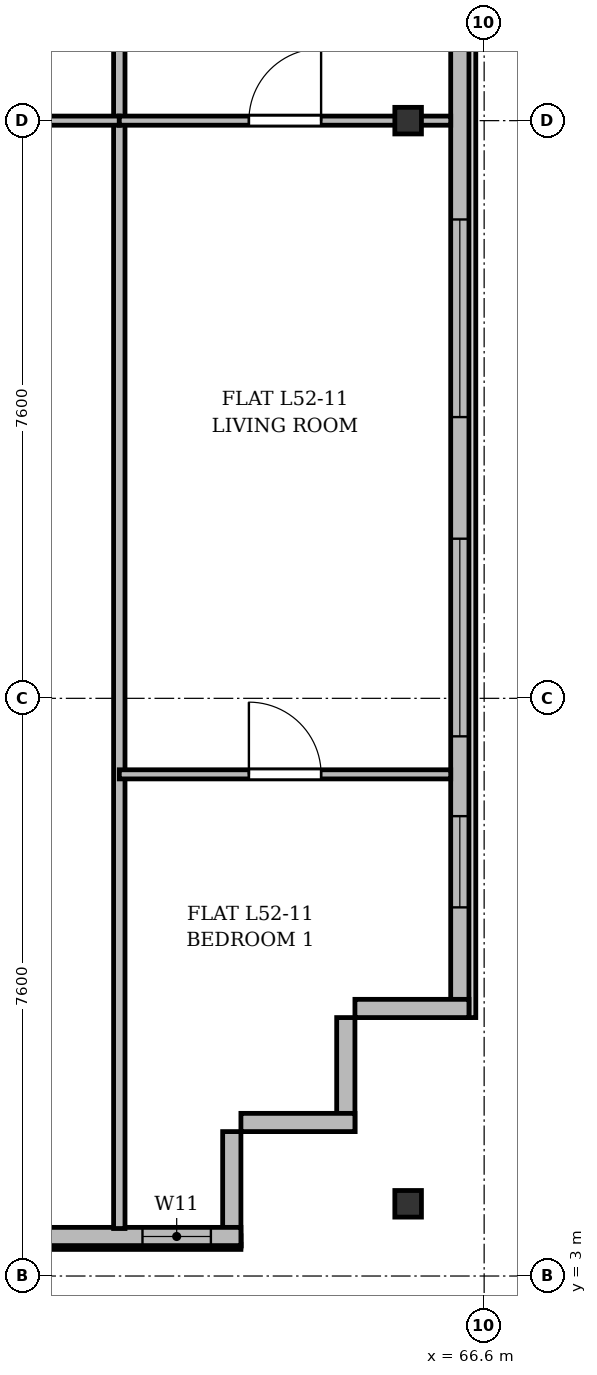
"""IFC4 building model, lengths in metres.
Left out: names, types, materials, properties, quantities, classifications, styles, units other than length and angle.
Written with IfcOpenShell. Run it as: python <this file> out.ifc"""

import sys

from ifc_helpers import new_model, si_unit, direction, frame, frame_2d, origin, origin_2d, place, context, subcontext, project, spatial, rectangle, i_section, extrude, source, transform, mapped, element, fill, save


model = new_model("IFC4")
c1 = context("Model", 3, precision=1e-05, world=origin(), true_north=direction((0.0, 1.0)))
c2 = subcontext(c1, "Body", "Model", "MODEL_VIEW")
j1 = project(units=[si_unit("LENGTHUNIT", "METRE"), si_unit("PLANEANGLEUNIT", "RADIAN")], contexts=[c1])
p1 = place(None, origin())
s1 = spatial("IfcSite", under=j1, at=p1, CompositionType="ELEMENT")
p2 = place(p1, origin())
s2 = spatial("IfcBuilding", under=s1, at=p2, CompositionType="ELEMENT")
p3 = place(p2, frame((0.0, 0.0, 201.3)))
s3 = spatial("IfcBuildingStorey", under=s2, at=p3, CompositionType="ELEMENT", Elevation=201.3)
m1 = source(origin(), c2, "Body", "SweptSolid", [
    extrude(i_section(OverallWidth=0.35, OverallDepth=0.35, WebThickness=0.018, FlangeThickness=0.028, at=origin_2d()), origin(), (0.0, 0.0, 1.0), 3.6),
])
for number, where, z_axis, x_axis in (
    (1, (65.6, 3.95, 0.0), (0.0, 0.0, 1.0), (1.0, 0.0, 0.0)),
    (2, (65.6, 18.2, 0.0), (0.0, 0.0, 1.0), (1.0, 0.0, 0.0)),
):
    element("IfcColumn", number, at=place(p3, frame(where, z_axis=z_axis, x_axis=x_axis)), inside=s3, PredefinedType="COLUMN", context=c2, shape_type="MappedRepresentation", body=[
        mapped(m1, transform((0.0, 0.0, 0.0), x_axis=(1.0, 0.0, 0.0), y_axis=(0.0, 1.0, 0.0), z_axis=(0.0, 0.0, 1.0), scale=1.0)),
    ])
p4 = place(p3, frame((66.28, 45.5, 0.0), z_axis=(0.0, 0.0, 1.0), x_axis=(0.0, -1.0, 0.0)))
e3 = element("IfcWall", 3, at=p4, inside=s3, PredefinedType="SOLIDWALL", context=c2, shape_type="SweptSolid", body=[
    extrude(rectangle(XDim=39.1, YDim=0.24, at=frame_2d((19.55, 0.0))), origin(), (0.0, 0.0, 1.0), 3.22),
])
p5 = place(p4, frame((36.45, 0.0, 0.92)))
e4 = element("IfcOpeningElement", 4, at=p5, cuts=e3, PredefinedType="OPENING", context=c2, shape_type="SweptSolid", body=[
    extrude(rectangle(XDim=1.2, YDim=1.65, at=frame_2d((0.6, 0.825))), frame((0.0, 0.13, 0.0), z_axis=(0.0, -1.0, 0.0), x_axis=(1.0, 0.0, 0.0)), (0.0, 0.0, 1.0), 0.26),
])
p6 = place(p4, frame((32.8, 0.0, 0.92)))
e5 = element("IfcOpeningElement", 5, at=p6, cuts=e3, PredefinedType="OPENING", context=c2, shape_type="SweptSolid", body=[
    extrude(rectangle(XDim=2.6, YDim=1.9, at=frame_2d((1.3, 0.95))), frame((0.0, 0.13, 0.0), z_axis=(0.0, -1.0, 0.0), x_axis=(1.0, 0.0, 0.0)), (0.0, 0.0, 1.0), 0.26),
])
p7 = place(p4, frame((28.6, 0.0, 0.92)))
e6 = element("IfcOpeningElement", 6, at=p7, cuts=e3, PredefinedType="OPENING", context=c2, shape_type="SweptSolid", body=[
    extrude(rectangle(XDim=2.6, YDim=1.9, at=frame_2d((1.3, 0.95))), frame((0.0, 0.13, 0.0), z_axis=(0.0, -1.0, 0.0), x_axis=(1.0, 0.0, 0.0)), (0.0, 0.0, 1.0), 0.26),
])
p8 = place(p4, frame((21.4, 0.0, 0.92)))
e7 = element("IfcOpeningElement", 7, at=p8, cuts=e3, PredefinedType="OPENING", context=c2, shape_type="SweptSolid", body=[
    extrude(rectangle(XDim=2.6, YDim=1.9, at=frame_2d((1.3, 0.95))), frame((0.0, 0.13, 0.0), z_axis=(0.0, -1.0, 0.0), x_axis=(1.0, 0.0, 0.0)), (0.0, 0.0, 1.0), 0.26),
])
p9 = place(p4, frame((7.4, 0.0, 0.92)))
e8 = element("IfcOpeningElement", 8, at=p9, cuts=e3, PredefinedType="OPENING", context=c2, shape_type="SweptSolid", body=[
    extrude(rectangle(XDim=2.6, YDim=1.9, at=frame_2d((1.3, 0.95))), frame((0.0, 0.13, 0.0), z_axis=(0.0, -1.0, 0.0), x_axis=(1.0, 0.0, 0.0)), (0.0, 0.0, 1.0), 0.26),
])
p10 = place(p4, frame((4.5, 0.0, 0.92)))
e9 = element("IfcOpeningElement", 9, at=p10, cuts=e3, PredefinedType="OPENING", context=c2, shape_type="SweptSolid", body=[
    extrude(rectangle(XDim=1.2, YDim=1.65, at=frame_2d((0.6, 0.825))), frame((0.0, 0.13, 0.0), z_axis=(0.0, -1.0, 0.0), x_axis=(1.0, 0.0, 0.0)), (0.0, 0.0, 1.0), 0.26),
])
p11 = place(p4, frame((1.15, 0.0, 0.92)))
e10 = element("IfcOpeningElement", 10, at=p11, cuts=e3, PredefinedType="OPENING", context=c2, shape_type="SweptSolid", body=[
    extrude(rectangle(XDim=1.2, YDim=1.65, at=frame_2d((0.6, 0.825))), frame((0.0, 0.13, 0.0), z_axis=(0.0, -1.0, 0.0), x_axis=(1.0, 0.0, 0.0)), (0.0, 0.0, 1.0), 0.26),
])
p12 = place(p3, frame((66.4, 6.52, 0.0), z_axis=(0.0, 0.0, 1.0), x_axis=(-1.0, 0.0, 0.0)))
e11 = element("IfcWall", 11, at=p12, inside=s3, PredefinedType="SOLIDWALL", context=c2, shape_type="SweptSolid", body=[
    extrude(rectangle(XDim=1.5, YDim=0.24, at=frame_2d((0.75, 0.0))), origin(), (0.0, 0.0, 1.0), 2.72),
])
for number, where, z_axis, x_axis in (
    (12, (64.78, 6.4, 0.0), (0.0, 0.0, 1.0), (0.0, -1.0, 0.0)),
    (13, (64.9, 5.02, 0.0), (0.0, 0.0, 1.0), (-1.0, 0.0, 0.0)),
):
    element("IfcWall", number, at=place(p3, frame(where, z_axis=z_axis, x_axis=x_axis)), inside=s3, PredefinedType="SOLIDWALL", context=c2, shape_type="SweptSolid", body=[
        extrude(rectangle(XDim=1.5, YDim=0.24, at=frame_2d((0.75, 0.0))), origin(), (0.0, 0.0, 1.0), 3.22),
    ])
p13 = place(p3, frame((63.28, 4.9, 0.0), z_axis=(0.0, 0.0, 1.0), x_axis=(0.0, -1.0, 0.0)))
e14 = element("IfcWall", 14, at=p13, inside=s3, PredefinedType="SOLIDWALL", context=c2, shape_type="SweptSolid", body=[
    extrude(rectangle(XDim=1.5, YDim=0.24, at=frame_2d((0.75, 0.0))), origin(), (0.0, 0.0, 1.0), 2.77),
])
p14 = place(p3, frame((63.4, 3.52, 0.0), z_axis=(0.0, 0.0, 1.0), x_axis=(-1.0, 0.0, 0.0)))
e15 = element("IfcWall", 15, at=p14, inside=s3, PredefinedType="SOLIDWALL", context=c2, shape_type="SweptSolid", body=[
    extrude(rectangle(XDim=19.6, YDim=0.24, at=frame_2d((9.8, 0.0))), origin(), (0.0, 0.0, 1.0), 3.22),
])
p15 = place(p14, frame((0.395, 0.0, 0.9)))
e16 = element("IfcOpeningElement", 16, at=p15, cuts=e15, PredefinedType="OPENING", context=c2, shape_type="SweptSolid", body=[
    extrude(rectangle(XDim=0.9, YDim=1.65, at=frame_2d((0.45, 0.825))), frame((0.0, 0.13, 0.0), z_axis=(0.0, -1.0, 0.0), x_axis=(1.0, 0.0, 0.0)), (0.0, 0.0, 1.0), 0.26),
])
p16 = place(p14, frame((3.4, 0.0, 0.9)))
e17 = element("IfcOpeningElement", 17, at=p16, cuts=e15, PredefinedType="OPENING", context=c2, shape_type="SweptSolid", body=[
    extrude(rectangle(XDim=2.0, YDim=1.95, at=frame_2d((1.0, 0.975))), frame((0.0, 0.13, 0.0), z_axis=(0.0, -1.0, 0.0), x_axis=(1.0, 0.0, 0.0)), (0.0, 0.0, 1.0), 0.26),
])
p17 = place(p14, frame((7.45, 0.0, 0.9)))
e18 = element("IfcOpeningElement", 18, at=p17, cuts=e15, PredefinedType="OPENING", context=c2, shape_type="SweptSolid", body=[
    extrude(rectangle(XDim=1.5, YDim=1.75, at=frame_2d((0.75, 0.875))), frame((0.0, 0.13, 0.0), z_axis=(0.0, -1.0, 0.0), x_axis=(1.0, 0.0, 0.0)), (0.0, 0.0, 1.0), 0.26),
])
p18 = place(p14, frame((9.7, 0.0, 0.9)))
e19 = element("IfcOpeningElement", 19, at=p18, cuts=e15, PredefinedType="OPENING", context=c2, shape_type="SweptSolid", body=[
    extrude(rectangle(XDim=1.8, YDim=1.8, at=frame_2d((0.9, 0.9))), frame((0.0, 0.13, 0.0), z_axis=(0.0, -1.0, 0.0), x_axis=(1.0, 0.0, 0.0)), (0.0, 0.0, 1.0), 0.26),
])
p19 = place(p14, frame((13.42, 0.0, 0.0)))
e20 = element("IfcOpeningElement", 20, at=p19, cuts=e15, PredefinedType="OPENING", context=c2, shape_type="SweptSolid", body=[
    extrude(rectangle(XDim=1.2, YDim=2.2, at=frame_2d((0.6, 1.1))), frame((0.0, 0.13, 0.0), z_axis=(0.0, -1.0, 0.0), x_axis=(1.0, 0.0, 0.0)), (0.0, 0.0, 1.0), 0.26),
])
p20 = place(p14, frame((16.405, 0.0, 0.9)))
e21 = element("IfcOpeningElement", 21, at=p20, cuts=e15, PredefinedType="OPENING", context=c2, shape_type="SweptSolid", body=[
    extrude(rectangle(XDim=1.5, YDim=1.75, at=frame_2d((0.75, 0.875))), frame((0.0, 0.13, 0.0), z_axis=(0.0, -1.0, 0.0), x_axis=(1.0, 0.0, 0.0)), (0.0, 0.0, 1.0), 0.26),
])
p21 = place(p3, frame((61.8, 3.625, 0.0), z_axis=(0.0, 0.0, 1.0), x_axis=(0.0, 1.0, 0.0)))
e22 = element("IfcWall", 22, at=p21, inside=s3, PredefinedType="PARTITIONING", context=c2, shape_type="SweptSolid", body=[
    extrude(rectangle(XDim=27.175, YDim=0.15, at=frame_2d((13.587, 0.0))), origin(), (0.0, 0.0, 1.0), 2.77),
])
p22 = place(p3, frame((56.2, 18.2, 0.0), z_axis=(0.0, 0.0, 1.0), x_axis=(1.0, 0.0, 0.0)))
e23 = element("IfcWall", 23, at=p22, inside=s3, PredefinedType="PARTITIONING", context=c2, shape_type="SweptSolid", body=[
    extrude(rectangle(XDim=5.6, YDim=0.12, at=frame_2d((2.8, 0.0))), origin(), (0.0, 0.0, 1.0), 2.77),
])
p23 = place(p22, frame((3.714, 0.0, 0.0)))
e24 = element("IfcOpeningElement", 24, at=p23, cuts=e23, PredefinedType="OPENING", context=c2, shape_type="SweptSolid", body=[
    extrude(rectangle(XDim=0.95, YDim=2.15, at=frame_2d((0.475, 1.075))), frame((0.0, 0.07, 0.0), z_axis=(0.0, -1.0, 0.0), x_axis=(1.0, 0.0, 0.0)), (0.0, 0.0, 1.0), 0.14),
])
p24 = place(p3, frame((61.8, 18.2, 0.0), z_axis=(0.0, 0.0, 1.0), x_axis=(1.0, 0.0, 0.0)))
e25 = element("IfcWall", 25, at=p24, inside=s3, PredefinedType="PARTITIONING", context=c2, shape_type="SweptSolid", body=[
    extrude(rectangle(XDim=4.36, YDim=0.12, at=frame_2d((2.18, 0.0))), origin(), (0.0, 0.0, 1.0), 2.77),
])
p25 = place(p24, frame((1.705, 0.0, 0.0)))
e26 = element("IfcOpeningElement", 26, at=p25, cuts=e25, PredefinedType="OPENING", context=c2, shape_type="SweptSolid", body=[
    extrude(rectangle(XDim=0.95, YDim=2.15, at=frame_2d((0.475, 1.075))), frame((0.0, 0.07, 0.0), z_axis=(0.0, -1.0, 0.0), x_axis=(1.0, 0.0, 0.0)), (0.0, 0.0, 1.0), 0.14),
])
p26 = place(p3, frame((61.8, 9.6, 0.0), z_axis=(0.0, 0.0, 1.0), x_axis=(1.0, 0.0, 0.0)))
e27 = element("IfcWall", 27, at=p26, inside=s3, PredefinedType="PARTITIONING", context=c2, shape_type="SweptSolid", body=[
    extrude(rectangle(XDim=4.36, YDim=0.12, at=frame_2d((2.18, 0.0))), origin(), (0.0, 0.0, 1.0), 2.72),
])
p27 = place(p26, frame((1.705, 0.0, 0.0)))
e28 = element("IfcOpeningElement", 28, at=p27, cuts=e27, PredefinedType="OPENING", context=c2, shape_type="SweptSolid", body=[
    extrude(rectangle(XDim=0.95, YDim=2.15, at=frame_2d((0.475, 1.075))), frame((0.0, 0.07, 0.0), z_axis=(0.0, -1.0, 0.0), x_axis=(1.0, 0.0, 0.0)), (0.0, 0.0, 1.0), 0.14),
])
m2 = source(origin(), c2, "Body", "SweptSolid", [
    extrude(rectangle(XDim=1.2, YDim=1.65, at=frame_2d((0.6, 0.825))), frame((0.0, 0.03, 0.0), z_axis=(0.0, -1.0, 0.0), x_axis=(1.0, 0.0, 0.0)), (0.0, 0.0, 1.0), 0.06),
])
p28 = place(p5, origin())
e29 = element("IfcWindow", 29, at=p28, inside=s3, PartitioningType="SINGLE_PANEL", PredefinedType="WINDOW", context=c2, shape_type="MappedRepresentation", body=[
    mapped(m2, transform((0.0, 0.0, 0.0), x_axis=(1.0, 0.0, 0.0), y_axis=(0.0, 1.0, 0.0), z_axis=(0.0, 0.0, 1.0), scale=1.0)),
])
fill(e4, e29)
m3 = source(origin(), c2, "Body", "SweptSolid", [
    extrude(rectangle(XDim=2.6, YDim=1.9, at=frame_2d((1.3, 0.95))), frame((0.0, 0.03, 0.0), z_axis=(0.0, -1.0, 0.0), x_axis=(1.0, 0.0, 0.0)), (0.0, 0.0, 1.0), 0.06),
])
p29 = place(p6, origin())
e30 = element("IfcWindow", 30, at=p29, inside=s3, PartitioningType="SINGLE_PANEL", PredefinedType="WINDOW", context=c2, shape_type="MappedRepresentation", body=[
    mapped(m3, transform((0.0, 0.0, 0.0), x_axis=(1.0, 0.0, 0.0), y_axis=(0.0, 1.0, 0.0), z_axis=(0.0, 0.0, 1.0), scale=1.0)),
])
fill(e5, e30)
p30 = place(p7, origin())
e31 = element("IfcWindow", 31, at=p30, inside=s3, PartitioningType="SINGLE_PANEL", PredefinedType="WINDOW", context=c2, shape_type="MappedRepresentation", body=[
    mapped(m3, transform((0.0, 0.0, 0.0), x_axis=(1.0, 0.0, 0.0), y_axis=(0.0, 1.0, 0.0), z_axis=(0.0, 0.0, 1.0), scale=1.0)),
])
fill(e6, e31)
m4 = source(origin(), c2, "Body", "SweptSolid", [
    extrude(rectangle(XDim=0.9, YDim=1.65, at=frame_2d((0.45, 0.825))), frame((0.0, 0.03, 0.0), z_axis=(0.0, -1.0, 0.0), x_axis=(1.0, 0.0, 0.0)), (0.0, 0.0, 1.0), 0.06),
])
p31 = place(p15, origin())
e32 = element("IfcWindow", 32, at=p31, inside=s3, PartitioningType="SINGLE_PANEL", PredefinedType="WINDOW", context=c2, shape_type="MappedRepresentation", body=[
    mapped(m4, transform((0.0, 0.0, 0.0), x_axis=(1.0, 0.0, 0.0), y_axis=(0.0, 1.0, 0.0), z_axis=(0.0, 0.0, 1.0), scale=1.0)),
])
fill(e16, e32)
m5 = source(origin(), c2, "Body", "SweptSolid", [
    extrude(rectangle(XDim=0.95, YDim=2.15, at=frame_2d((0.475, 1.075))), frame((0.0, 0.025, 0.0), z_axis=(0.0, -1.0, 0.0), x_axis=(1.0, 0.0, 0.0)), (0.0, 0.0, 1.0), 0.05),
])
p32 = place(p25, origin())
e33 = element("IfcDoor", 33, at=p32, inside=s3, OperationType="SINGLE_SWING_RIGHT", PredefinedType="DOOR", context=c2, shape_type="MappedRepresentation", body=[
    mapped(m5, transform((0.0, 0.0, 0.0), x_axis=(1.0, 0.0, 0.0), y_axis=(0.0, 1.0, 0.0), z_axis=(0.0, 0.0, 1.0), scale=1.0)),
])
fill(e26, e33)
p33 = place(p27, origin())
e34 = element("IfcDoor", 34, at=p33, inside=s3, OperationType="SINGLE_SWING_LEFT", PredefinedType="DOOR", context=c2, shape_type="MappedRepresentation", body=[
    mapped(m5, transform((0.0, 0.0, 0.0), x_axis=(1.0, 0.0, 0.0), y_axis=(0.0, 1.0, 0.0), z_axis=(0.0, 0.0, 1.0), scale=1.0)),
])
fill(e28, e34)
save(model, sys.argv[1])
